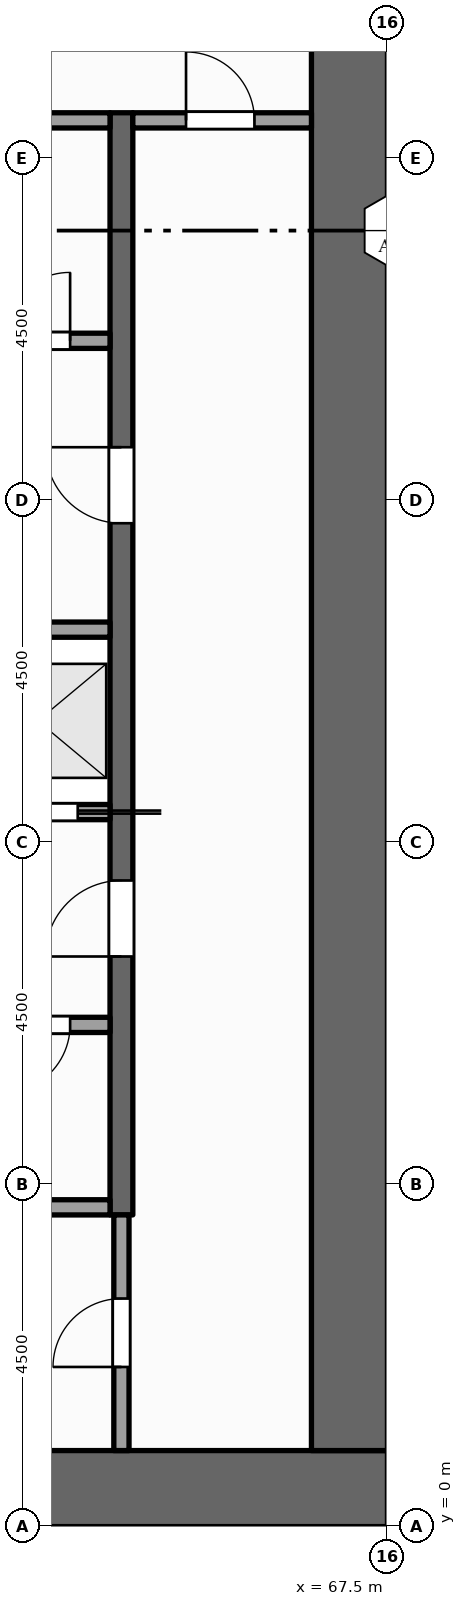
"""IFC4 building model, lengths in metres.
Left out: names, types, materials, properties, quantities, classifications, styles, units other than length and angle.
Written with IfcOpenShell. Run it as: python <this file> out.ifc"""

import sys

from ifc_helpers import new_model, si_unit, direction, frame, frame_2d, origin, place, context, subcontext, project, spatial, rectangle, extrude, element, fill, save


model = new_model("IFC4")
c1 = context("Model", 3, precision=1e-05, world=origin(), true_north=direction((0.0, 1.0)))
c2 = subcontext(c1, "Body", "Model", "MODEL_VIEW")
j1 = project(units=[si_unit("LENGTHUNIT", "METRE"), si_unit("PLANEANGLEUNIT", "RADIAN")], contexts=[c1])
p1 = place(None, origin())
s1 = spatial("IfcSite", under=j1, at=p1, CompositionType="ELEMENT")
p2 = place(p1, origin())
s2 = spatial("IfcBuilding", under=s1, at=p2, CompositionType="ELEMENT")
p3 = place(p2, frame((0.0, 0.0, 211.0)))
s3 = spatial("IfcBuildingStorey", under=s2, at=p3, CompositionType="ELEMENT", Elevation=211.0)
p4 = place(p3, frame((67.5, 0.5, -0.15), z_axis=(0.0, 0.0, 1.0), x_axis=(-1.0, 0.0, 0.0)))
e1 = element("IfcWall", 1, at=p4, inside=s3, PredefinedType="SHEAR", context=c2, shape_type="SweptSolid", body=[
    extrude(rectangle(XDim=13.5, YDim=1.0, at=frame_2d((6.75, 0.0))), origin(), (0.0, 0.0, 1.0), 4.0),
])
p5 = place(p3, frame((67.0, 1.0, -0.15), z_axis=(0.0, 0.0, 1.0), x_axis=(0.0, 1.0, 0.0)))
e2 = element("IfcWall", 2, at=p5, inside=s3, PredefinedType="SHEAR", context=c2, shape_type="SweptSolid", body=[
    extrude(rectangle(XDim=20.5, YDim=1.0, at=frame_2d((10.25, 0.0))), origin(), (0.0, 0.0, 1.0), 4.0),
])
p6 = place(p3, frame((64.0, 1.0, 0.0), z_axis=(0.0, 0.0, 1.0), x_axis=(0.0, 1.0, 0.0)))
e3 = element("IfcWall", 3, at=p6, inside=s3, PredefinedType="PARTITIONING", context=c2, shape_type="SweptSolid", body=[
    extrude(rectangle(XDim=3.1, YDim=0.2, at=frame_2d((1.55, 0.0))), origin(), (0.0, 0.0, 1.0), 3.85),
])
p7 = place(p6, frame((1.1, 0.0, 0.0)))
e4 = element("IfcOpeningElement", 4, at=p7, cuts=e3, PredefinedType="OPENING", context=c2, shape_type="SweptSolid", body=[
    extrude(rectangle(XDim=0.9, YDim=2.1, at=frame_2d((0.45, 1.05))), frame((0.0, 0.11, 0.0), z_axis=(0.0, -1.0, 0.0), x_axis=(1.0, 0.0, 0.0)), (0.0, 0.0, 1.0), 0.22),
])
p8 = place(p3, frame((64.0, 4.1, 0.0), z_axis=(0.0, 0.0, 1.0), x_axis=(0.0, 1.0, 0.0)))
e5 = element("IfcWall", 5, at=p8, inside=s3, PredefinedType="SHEAR", context=c2, shape_type="SweptSolid", body=[
    extrude(rectangle(XDim=14.5, YDim=0.3, at=frame_2d((7.25, 0.0))), origin(), (0.0, 0.0, 1.0), 3.85),
])
p9 = place(p8, frame((3.4, 0.0, 0.0)))
e6 = element("IfcOpeningElement", 6, at=p9, cuts=e5, PredefinedType="OPENING", context=c2, shape_type="SweptSolid", body=[
    extrude(rectangle(XDim=1.0, YDim=2.1, at=frame_2d((0.5, 1.05))), frame((0.0, 0.16, 0.0), z_axis=(0.0, -1.0, 0.0), x_axis=(1.0, 0.0, 0.0)), (0.0, 0.0, 1.0), 0.32),
])
p10 = place(p8, frame((9.1, 0.0, 0.0)))
e7 = element("IfcOpeningElement", 7, at=p10, cuts=e5, PredefinedType="OPENING", context=c2, shape_type="SweptSolid", body=[
    extrude(rectangle(XDim=1.0, YDim=2.1, at=frame_2d((0.5, 1.05))), frame((0.0, 0.16, 0.0), z_axis=(0.0, -1.0, 0.0), x_axis=(1.0, 0.0, 0.0)), (0.0, 0.0, 1.0), 0.32),
])
p11 = place(p3, frame((61.9, 4.2, 0.0), z_axis=(0.0, 0.0, 1.0), x_axis=(1.0, 0.0, 0.0)))
e8 = element("IfcWall", 8, at=p11, inside=s3, PredefinedType="PARTITIONING", context=c2, shape_type="SweptSolid", body=[
    extrude(rectangle(XDim=1.95, YDim=0.2, at=frame_2d((0.975, 0.0))), origin(), (0.0, 0.0, 1.0), 3.85),
])
p12 = place(p3, frame((61.9, 6.6, 0.0), z_axis=(0.0, 0.0, 1.0), x_axis=(1.0, 0.0, 0.0)))
e9 = element("IfcWall", 9, at=p12, inside=s3, PredefinedType="PARTITIONING", context=c2, shape_type="SweptSolid", body=[
    extrude(rectangle(XDim=1.95, YDim=0.2, at=frame_2d((0.975, 0.0))), origin(), (0.0, 0.0, 1.0), 3.85),
])
p13 = place(p12, frame((0.525, 0.0, 0.0)))
e10 = element("IfcOpeningElement", 10, at=p13, cuts=e9, PredefinedType="OPENING", context=c2, shape_type="SweptSolid", body=[
    extrude(rectangle(XDim=0.9, YDim=2.1, at=frame_2d((0.45, 1.05))), frame((0.0, 0.11, 0.0), z_axis=(0.0, -1.0, 0.0), x_axis=(1.0, 0.0, 0.0)), (0.0, 0.0, 1.0), 0.22),
])
p14 = place(p3, frame((61.9, 9.4, 0.0), z_axis=(0.0, 0.0, 1.0), x_axis=(1.0, 0.0, 0.0)))
e11 = element("IfcWall", 11, at=p14, inside=s3, PredefinedType="SOLIDWALL", context=c2, shape_type="SweptSolid", body=[
    extrude(rectangle(XDim=1.95, YDim=0.2, at=frame_2d((0.975, 0.0))), origin(), (0.0, 0.0, 1.0), 3.85),
])
p15 = place(p14, frame((0.425, 0.0, 0.012)))
e12 = element("IfcOpeningElement", 12, at=p15, cuts=e11, PredefinedType="OPENING", context=c2, shape_type="SweptSolid", body=[
    extrude(rectangle(XDim=1.1, YDim=2.1, at=frame_2d((0.55, 1.05))), frame((0.0, 0.11, 0.0), z_axis=(0.0, -1.0, 0.0), x_axis=(1.0, 0.0, 0.0)), (0.0, 0.0, 1.0), 0.22),
])
p16 = place(p3, frame((61.9, 11.8, 0.0), z_axis=(0.0, 0.0, 1.0), x_axis=(1.0, 0.0, 0.0)))
e13 = element("IfcWall", 13, at=p16, inside=s3, PredefinedType="SOLIDWALL", context=c2, shape_type="SweptSolid", body=[
    extrude(rectangle(XDim=1.95, YDim=0.2, at=frame_2d((0.975, 0.0))), origin(), (0.0, 0.0, 1.0), 3.85),
])
p17 = place(p3, frame((61.9, 15.6, 0.0), z_axis=(0.0, 0.0, 1.0), x_axis=(1.0, 0.0, 0.0)))
e14 = element("IfcWall", 14, at=p17, inside=s3, PredefinedType="PARTITIONING", context=c2, shape_type="SweptSolid", body=[
    extrude(rectangle(XDim=1.95, YDim=0.2, at=frame_2d((0.975, 0.0))), origin(), (0.0, 0.0, 1.0), 3.85),
])
p18 = place(p17, frame((0.525, 0.0, 0.0)))
e15 = element("IfcOpeningElement", 15, at=p18, cuts=e14, PredefinedType="OPENING", context=c2, shape_type="SweptSolid", body=[
    extrude(rectangle(XDim=0.9, YDim=2.1, at=frame_2d((0.45, 1.05))), frame((0.0, 0.11, 0.0), z_axis=(0.0, -1.0, 0.0), x_axis=(1.0, 0.0, 0.0)), (0.0, 0.0, 1.0), 0.22),
])
p19 = place(p3, frame((61.9, 18.5, 0.0), z_axis=(0.0, 0.0, 1.0), x_axis=(1.0, 0.0, 0.0)))
e16 = element("IfcWall", 16, at=p19, inside=s3, PredefinedType="PARTITIONING", context=c2, shape_type="SweptSolid", body=[
    extrude(rectangle(XDim=1.95, YDim=0.2, at=frame_2d((0.975, 0.0))), origin(), (0.0, 0.0, 1.0), 3.85),
])
p20 = place(p3, frame((64.15, 18.5, 0.0), z_axis=(0.0, 0.0, 1.0), x_axis=(1.0, 0.0, 0.0)))
e17 = element("IfcWall", 17, at=p20, inside=s3, PredefinedType="PARTITIONING", context=c2, shape_type="SweptSolid", body=[
    extrude(rectangle(XDim=2.35, YDim=0.2, at=frame_2d((1.175, 0.0))), origin(), (0.0, 0.0, 1.0), 3.85),
])
p21 = place(p20, frame((0.7, 0.0, 0.0)))
e18 = element("IfcOpeningElement", 18, at=p21, cuts=e17, PredefinedType="OPENING", context=c2, shape_type="SweptSolid", body=[
    extrude(rectangle(XDim=0.9, YDim=2.1, at=frame_2d((0.45, 1.05))), frame((0.0, 0.11, 0.0), z_axis=(0.0, -1.0, 0.0), x_axis=(1.0, 0.0, 0.0)), (0.0, 0.0, 1.0), 0.22),
])
p22 = place(p15, origin())
e19 = element("IfcDoor", 19, at=p22, inside=s3, OperationType="SLIDING_TO_RIGHT", PredefinedType="DOOR", context=c2, shape_type="SweptSolid", body=[
    extrude(rectangle(XDim=1.1, YDim=2.1, at=frame_2d((0.55, 1.05))), frame((0.0, 0.025, 0.0), z_axis=(0.0, -1.0, 0.0), x_axis=(1.0, 0.0, 0.0)), (0.0, 0.0, 1.0), 0.05),
])
fill(e12, e19)
p23 = place(p9, origin())
e20 = element("IfcDoor", 20, at=p23, inside=s3, OperationType="SINGLE_SWING_LEFT", PredefinedType="DOOR", context=c2, shape_type="SweptSolid", body=[
    extrude(rectangle(XDim=1.0, YDim=2.1, at=frame_2d((0.5, 1.05))), frame((0.0, 0.025, 0.0), z_axis=(0.0, -1.0, 0.0), x_axis=(1.0, 0.0, 0.0)), (0.0, 0.0, 1.0), 0.05),
])
fill(e6, e20)
p24 = place(p10, origin())
e21 = element("IfcDoor", 21, at=p24, inside=s3, OperationType="SINGLE_SWING_RIGHT", PredefinedType="DOOR", context=c2, shape_type="SweptSolid", body=[
    extrude(rectangle(XDim=1.0, YDim=2.1, at=frame_2d((0.5, 1.05))), frame((0.0, 0.025, 0.0), z_axis=(0.0, -1.0, 0.0), x_axis=(1.0, 0.0, 0.0)), (0.0, 0.0, 1.0), 0.05),
])
fill(e7, e21)
p25 = place(p7, origin())
e22 = element("IfcDoor", 22, at=p25, inside=s3, OperationType="SINGLE_SWING_LEFT", PredefinedType="DOOR", context=c2, shape_type="SweptSolid", body=[
    extrude(rectangle(XDim=0.9, YDim=2.1, at=frame_2d((0.45, 1.05))), frame((0.0, 0.025, 0.0), z_axis=(0.0, -1.0, 0.0), x_axis=(1.0, 0.0, 0.0)), (0.0, 0.0, 1.0), 0.05),
])
fill(e4, e22)
p26 = place(p21, origin())
e23 = element("IfcDoor", 23, at=p26, inside=s3, OperationType="SINGLE_SWING_LEFT", PredefinedType="DOOR", context=c2, shape_type="SweptSolid", body=[
    extrude(rectangle(XDim=0.9, YDim=2.1, at=frame_2d((0.45, 1.05))), frame((0.0, 0.025, 0.0), z_axis=(0.0, -1.0, 0.0), x_axis=(1.0, 0.0, 0.0)), (0.0, 0.0, 1.0), 0.05),
])
fill(e18, e23)
p27 = place(p13, origin())
e24 = element("IfcDoor", 24, at=p27, inside=s3, OperationType="SINGLE_SWING_LEFT", PredefinedType="DOOR", context=c2, shape_type="SweptSolid", body=[
    extrude(rectangle(XDim=0.9, YDim=2.1, at=frame_2d((0.45, 1.05))), frame((0.0, 0.025, 0.0), z_axis=(0.0, -1.0, 0.0), x_axis=(1.0, 0.0, 0.0)), (0.0, 0.0, 1.0), 0.05),
])
fill(e10, e24)
p28 = place(p18, origin())
e25 = element("IfcDoor", 25, at=p28, inside=s3, OperationType="SINGLE_SWING_RIGHT", PredefinedType="DOOR", context=c2, shape_type="SweptSolid", body=[
    extrude(rectangle(XDim=0.9, YDim=2.1, at=frame_2d((0.45, 1.05))), frame((0.0, 0.025, 0.0), z_axis=(0.0, -1.0, 0.0), x_axis=(1.0, 0.0, 0.0)), (0.0, 0.0, 1.0), 0.05),
])
fill(e15, e25)
save(model, sys.argv[1])
